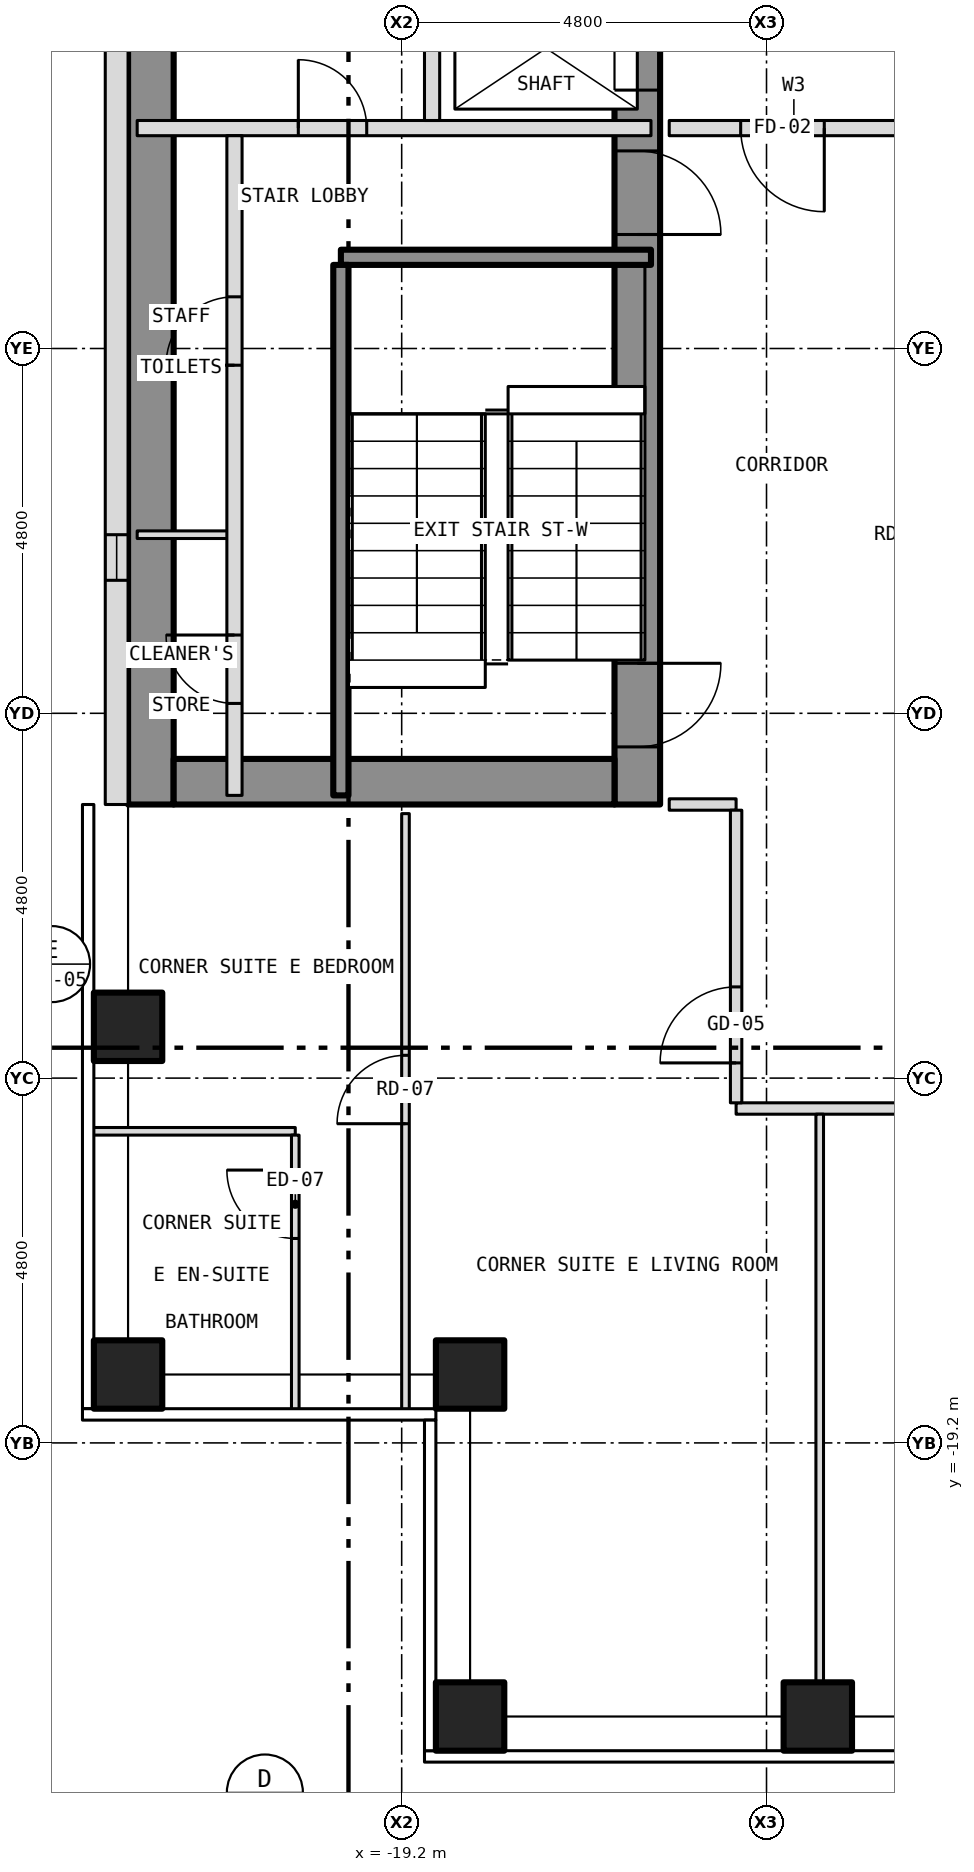
"""IFC4 building model, lengths in metres.
Left out: names, types, materials, properties, quantities, classifications, styles, units other than length and angle.
Written with IfcOpenShell. Run it as: python <this file> out.ifc"""

import sys

from ifc_helpers import new_model, si_unit, direction, frame, frame_2d, origin, origin_2d, place, context, subcontext, project, spatial, rectangle, hollow_rectangle, extrude, element, fill, save


model = new_model("IFC4")
c1 = context("Model", 3, precision=1e-05, world=origin(), true_north=direction((0.0, 1.0)))
c2 = subcontext(c1, "Body", "Model", "MODEL_VIEW")
j1 = project(units=[si_unit("LENGTHUNIT", "METRE"), si_unit("PLANEANGLEUNIT", "RADIAN")], contexts=[c1])
p1 = place(None, origin())
s1 = spatial("IfcSite", under=j1, at=p1, CompositionType="ELEMENT")
p2 = place(p1, origin())
s2 = spatial("IfcBuilding", under=s1, at=p2, CompositionType="ELEMENT")
p3 = place(p2, frame((0.0, 0.0, 117.0)))
s3 = spatial("IfcBuildingStorey", under=s2, at=p3, CompositionType="ELEMENT", Elevation=117.0)
for number, where, z_axis, x_axis in (
    (1, (-18.3, -22.8, -0.15), (0.0, 0.0, 1.0), (1.0, 0.0, 0.0)),
    (2, (-13.725, -22.8, -0.15), (0.0, 0.0, 1.0), (1.0, 0.0, 0.0)),
    (3, (-22.8, -18.3, -0.15), (0.0, 0.0, 1.0), (1.0, 0.0, 0.0)),
    (4, (-22.8, -13.725, -0.15), (0.0, 0.0, 1.0), (1.0, 0.0, 0.0)),
    (5, (-18.3, -18.3, -0.15), (0.0, 0.0, 1.0), (1.0, 0.0, 0.0)),
):
    element("IfcColumn", number, at=place(p3, frame(where, z_axis=z_axis, x_axis=x_axis)), inside=s3, PredefinedType="COLUMN", context=c2, shape_type="SweptSolid", body=[
        extrude(hollow_rectangle(XDim=0.9, YDim=0.9, WallThickness=0.05, at=origin_2d()), origin(), (0.0, 0.0, 1.0), 3.5),
    ])
p4 = place(p3, frame((-16.1, -10.8, 0.0), z_axis=(0.0, 0.0, 1.0), x_axis=(0.0, 1.0, 0.0)))
e6 = element("IfcWall", 6, at=p4, inside=s3, PredefinedType="SHEAR", context=c2, shape_type="SweptSolid", body=[
    extrude(rectangle(XDim=21.6, YDim=0.6, at=frame_2d((10.8, 0.0))), origin(), (0.0, 0.0, 1.0), 3.25),
])
p5 = place(p4, frame((9.4, 0.0, 0.0)))
e7 = element("IfcOpeningElement", 7, at=p5, cuts=e6, PredefinedType="OPENING", context=c2, shape_type="SweptSolid", body=[
    extrude(rectangle(XDim=1.1, YDim=2.1, at=frame_2d((0.55, 1.05))), frame((0.0, 0.312, 0.0), z_axis=(0.0, -1.0, 0.0), x_axis=(1.0, 0.0, 0.0)), (0.0, 0.0, 1.0), 0.624),
])
p6 = place(p4, frame((11.5, 0.0, 0.0)))
e8 = element("IfcOpeningElement", 8, at=p6, cuts=e6, PredefinedType="OPENING", context=c2, shape_type="SweptSolid", body=[
    extrude(rectangle(XDim=1.1, YDim=2.1, at=frame_2d((0.55, 1.05))), frame((0.0, 0.312, 0.0), z_axis=(0.0, -1.0, 0.0), x_axis=(1.0, 0.0, 0.0)), (0.0, 0.0, 1.0), 0.624),
])
p7 = place(p4, frame((13.6, 0.0, 0.0)))
e9 = element("IfcOpeningElement", 9, at=p7, cuts=e6, PredefinedType="OPENING", context=c2, shape_type="SweptSolid", body=[
    extrude(rectangle(XDim=1.1, YDim=2.1, at=frame_2d((0.55, 1.05))), frame((0.0, 0.312, 0.0), z_axis=(0.0, -1.0, 0.0), x_axis=(1.0, 0.0, 0.0)), (0.0, 0.0, 1.0), 0.624),
])
p8 = place(p4, frame((15.7, 0.0, 0.0)))
e10 = element("IfcOpeningElement", 10, at=p8, cuts=e6, PredefinedType="OPENING", context=c2, shape_type="SweptSolid", body=[
    extrude(rectangle(XDim=1.1, YDim=2.1, at=frame_2d((0.55, 1.05))), frame((0.0, 0.312, 0.0), z_axis=(0.0, -1.0, 0.0), x_axis=(1.0, 0.0, 0.0)), (0.0, 0.0, 1.0), 0.624),
])
p9 = place(p4, frame((17.8, 0.0, 0.0)))
e11 = element("IfcOpeningElement", 11, at=p9, cuts=e6, PredefinedType="OPENING", context=c2, shape_type="SweptSolid", body=[
    extrude(rectangle(XDim=1.1, YDim=2.1, at=frame_2d((0.55, 1.05))), frame((0.0, 0.312, 0.0), z_axis=(0.0, -1.0, 0.0), x_axis=(1.0, 0.0, 0.0)), (0.0, 0.0, 1.0), 0.624),
])
p10 = place(p4, frame((0.758, 0.0, 0.0)))
e12 = element("IfcOpeningElement", 12, at=p10, cuts=e6, PredefinedType="OPENING", context=c2, shape_type="SweptSolid", body=[
    extrude(rectangle(XDim=1.1, YDim=2.1, at=frame_2d((0.55, 1.05))), frame((0.0, 0.312, 0.0), z_axis=(0.0, -1.0, 0.0), x_axis=(1.0, 0.0, 0.0)), (0.0, 0.0, 1.0), 0.624),
])
p11 = place(p4, frame((7.5, 0.0, 0.0)))
e13 = element("IfcOpeningElement", 13, at=p11, cuts=e6, PredefinedType="OPENING", context=c2, shape_type="SweptSolid", body=[
    extrude(rectangle(XDim=1.1, YDim=2.1, at=frame_2d((0.55, 1.05))), frame((0.0, 0.312, 0.0), z_axis=(0.0, -1.0, 0.0), x_axis=(1.0, 0.0, 0.0)), (0.0, 0.0, 1.0), 0.624),
])
p12 = place(p3, frame((-22.5, -10.8, 0.0), z_axis=(0.0, 0.0, 1.0), x_axis=(0.0, 1.0, 0.0)))
e14 = element("IfcWall", 14, at=p12, inside=s3, PredefinedType="SHEAR", context=c2, shape_type="SweptSolid", body=[
    extrude(rectangle(XDim=21.6, YDim=0.6, at=frame_2d((10.8, 0.0))), origin(), (0.0, 0.0, 1.0), 3.25),
])
p13 = place(p3, frame((-22.2, -10.5, 0.0), z_axis=(0.0, 0.0, 1.0), x_axis=(1.0, 0.0, 0.0)))
e15 = element("IfcWall", 15, at=p13, inside=s3, PredefinedType="SHEAR", context=c2, shape_type="SweptSolid", body=[
    extrude(rectangle(XDim=5.8, YDim=0.6, at=frame_2d((2.9, 0.0))), origin(), (0.0, 0.0, 1.0), 3.25),
])
p14 = place(p3, frame((-22.95, 10.8, 0.0), z_axis=(0.0, 0.0, 1.0), x_axis=(0.0, -1.0, 0.0)))
e16 = element("IfcWall", 16, at=p14, inside=s3, PredefinedType="SOLIDWALL", context=c2, shape_type="SweptSolid", body=[
    extrude(rectangle(XDim=21.6, YDim=0.3, at=frame_2d((10.8, 0.0))), origin(), (0.0, 0.0, 1.0), 3.5),
])
p15 = place(p14, frame((18.05, 0.0, 1.0)))
e17 = element("IfcOpeningElement", 17, at=p15, cuts=e16, PredefinedType="OPENING", context=c2, shape_type="SweptSolid", body=[
    extrude(rectangle(XDim=0.6, YDim=1.5, at=frame_2d((0.3, 0.75))), frame((0.0, 0.162, 0.0), z_axis=(0.0, -1.0, 0.0), x_axis=(1.0, 0.0, 0.0)), (0.0, 0.0, 1.0), 0.324),
])
p16 = place(p3, frame((-23.28, -15.1, 0.0), z_axis=(0.0, 0.0, 1.0), x_axis=(1.0, 0.0, 0.0)))
e18 = element("IfcWall", 18, at=p16, inside=s3, PredefinedType="PARTITIONING", context=c2, shape_type="SweptSolid", body=[
    extrude(rectangle(XDim=2.68, YDim=0.1, at=frame_2d((1.34, 0.0))), origin(), (0.0, 0.0, 1.0), 3.35),
])
p17 = place(p3, frame((-14.8, -14.8, 0.0), z_axis=(0.0, 0.0, 1.0), x_axis=(1.0, 0.0, 0.0)))
e19 = element("IfcWall", 19, at=p17, inside=s3, PredefinedType="PARTITIONING", context=c2, shape_type="SweptSolid", body=[
    extrude(rectangle(XDim=6.85, YDim=0.15, at=frame_2d((3.425, 0.0))), origin(), (0.0, 0.0, 1.0), 3.35),
])
p18 = place(p17, frame((2.363, 0.0, 0.0)))
e20 = element("IfcOpeningElement", 20, at=p18, cuts=e19, PredefinedType="OPENING", context=c2, shape_type="SweptSolid", body=[
    extrude(rectangle(XDim=1.0, YDim=2.1, at=frame_2d((0.5, 1.05))), frame((0.0, 0.087, 0.0), z_axis=(0.0, -1.0, 0.0), x_axis=(1.0, 0.0, 0.0)), (0.0, 0.0, 1.0), 0.174),
])
p19 = place(p3, frame((-15.68, -10.8, 0.0), z_axis=(0.0, 0.0, 1.0), x_axis=(1.0, 0.0, 0.0)))
e21 = element("IfcWall", 21, at=p19, inside=s3, PredefinedType="PARTITIONING", context=c2, shape_type="SweptSolid", body=[
    extrude(rectangle(XDim=0.88, YDim=0.15, at=frame_2d((0.44, 0.0))), origin(), (0.0, 0.0, 1.0), 3.35),
])
p20 = place(p3, frame((-22.68, -7.25, 0.0), z_axis=(0.0, 0.0, 1.0), x_axis=(1.0, 0.0, 0.0)))
e22 = element("IfcWall", 22, at=p20, inside=s3, PredefinedType="PARTITIONING", context=c2, shape_type="SweptSolid", body=[
    extrude(rectangle(XDim=1.28, YDim=0.1, at=frame_2d((0.64, 0.0))), origin(), (0.0, 0.0, 1.0), 3.25),
])
p21 = place(p3, frame((-20.0, -3.6, 0.0), z_axis=(0.0, 0.0, 1.0), x_axis=(1.0, 0.0, 0.0)))
e23 = element("IfcWall", 23, at=p21, inside=s3, PredefinedType="SHEAR", context=c2, shape_type="SweptSolid", body=[
    extrude(rectangle(XDim=4.08, YDim=0.2, at=frame_2d((2.04, 0.0))), origin(), (0.0, 0.0, 1.0), 3.25),
])
p22 = place(p3, frame((-22.68, -1.9, 0.0), z_axis=(0.0, 0.0, 1.0), x_axis=(1.0, 0.0, 0.0)))
e24 = element("IfcWall", 24, at=p22, inside=s3, PredefinedType="PARTITIONING", context=c2, shape_type="SweptSolid", body=[
    extrude(rectangle(XDim=6.76, YDim=0.2, at=frame_2d((3.38, 0.0))), origin(), (0.0, 0.0, 1.0), 3.25),
])
p23 = place(p22, frame((2.12, 0.0, 0.0)))
e25 = element("IfcOpeningElement", 25, at=p23, cuts=e24, PredefinedType="OPENING", context=c2, shape_type="SweptSolid", body=[
    extrude(rectangle(XDim=0.9, YDim=2.1, at=frame_2d((0.45, 1.05))), frame((0.0, 0.112, 0.0), z_axis=(0.0, -1.0, 0.0), x_axis=(1.0, 0.0, 0.0)), (0.0, 0.0, 1.0), 0.224),
])
p24 = place(p3, frame((-15.68, -1.9, 0.0), z_axis=(0.0, 0.0, 1.0), x_axis=(1.0, 0.0, 0.0)))
e26 = element("IfcWall", 26, at=p24, inside=s3, PredefinedType="PARTITIONING", context=c2, shape_type="SweptSolid", body=[
    extrude(rectangle(XDim=3.28, YDim=0.2, at=frame_2d((1.64, 0.0))), origin(), (0.0, 0.0, 1.0), 3.35),
])
p25 = place(p24, frame((0.94, 0.0, 0.0)))
e27 = element("IfcOpeningElement", 27, at=p25, cuts=e26, PredefinedType="OPENING", context=c2, shape_type="SweptSolid", body=[
    extrude(rectangle(XDim=1.1, YDim=2.1, at=frame_2d((0.55, 1.05))), frame((0.0, 0.112, 0.0), z_axis=(0.0, -1.0, 0.0), x_axis=(1.0, 0.0, 0.0)), (0.0, 0.0, 1.0), 0.224),
])
p26 = place(p3, frame((-21.4, -10.68, 0.0), z_axis=(0.0, 0.0, 1.0), x_axis=(0.0, 1.0, 0.0)))
e28 = element("IfcWall", 28, at=p26, inside=s3, PredefinedType="PARTITIONING", context=c2, shape_type="SweptSolid", body=[
    extrude(rectangle(XDim=8.68, YDim=0.2, at=frame_2d((4.34, 0.0))), origin(), (0.0, 0.0, 1.0), 3.25),
])
p27 = place(p26, frame((1.21, 0.0, 0.0)))
e29 = element("IfcOpeningElement", 29, at=p27, cuts=e28, PredefinedType="OPENING", context=c2, shape_type="SweptSolid", body=[
    extrude(rectangle(XDim=0.9, YDim=2.1, at=frame_2d((0.45, 1.05))), frame((0.0, 0.112, 0.0), z_axis=(0.0, -1.0, 0.0), x_axis=(1.0, 0.0, 0.0)), (0.0, 0.0, 1.0), 0.224),
])
p28 = place(p26, frame((5.66, 0.0, 0.0)))
e30 = element("IfcOpeningElement", 30, at=p28, cuts=e28, PredefinedType="OPENING", context=c2, shape_type="SweptSolid", body=[
    extrude(rectangle(XDim=0.9, YDim=2.1, at=frame_2d((0.45, 1.05))), frame((0.0, 0.112, 0.0), z_axis=(0.0, -1.0, 0.0), x_axis=(1.0, 0.0, 0.0)), (0.0, 0.0, 1.0), 0.224),
])
p29 = place(p3, frame((-20.6, -18.78, 0.0), z_axis=(0.0, 0.0, 1.0), x_axis=(0.0, 1.0, 0.0)))
e31 = element("IfcWall", 31, at=p29, inside=s3, PredefinedType="PARTITIONING", context=c2, shape_type="SweptSolid", body=[
    extrude(rectangle(XDim=3.63, YDim=0.1, at=frame_2d((1.815, 0.0))), origin(), (0.0, 0.0, 1.0), 3.35),
])
p30 = place(p29, frame((2.27, 0.0, 0.0)))
e32 = element("IfcOpeningElement", 32, at=p30, cuts=e31, PredefinedType="OPENING", context=c2, shape_type="SweptSolid", body=[
    extrude(rectangle(XDim=0.9, YDim=2.1, at=frame_2d((0.45, 1.05))), frame((0.0, 0.062, 0.0), z_axis=(0.0, -1.0, 0.0), x_axis=(1.0, 0.0, 0.0)), (0.0, 0.0, 1.0), 0.124),
])
p31 = place(p3, frame((-20.0, -10.68, 0.0), z_axis=(0.0, 0.0, 1.0), x_axis=(0.0, 1.0, 0.0)))
e33 = element("IfcWall", 33, at=p31, inside=s3, PredefinedType="SHEAR", context=c2, shape_type="SweptSolid", body=[
    extrude(rectangle(XDim=6.98, YDim=0.2, at=frame_2d((3.49, 0.0))), origin(), (0.0, 0.0, 1.0), 3.25),
])
p32 = place(p3, frame((-19.15, -18.78, 0.0), z_axis=(0.0, 0.0, 1.0), x_axis=(0.0, 1.0, 0.0)))
e34 = element("IfcWall", 34, at=p32, inside=s3, PredefinedType="PARTITIONING", context=c2, shape_type="SweptSolid", body=[
    extrude(rectangle(XDim=7.86, YDim=0.1, at=frame_2d((3.93, 0.0))), origin(), (0.0, 0.0, 1.0), 2.817),
])
p33 = place(p32, frame((3.78, 0.0, 0.0)))
e35 = element("IfcOpeningElement", 35, at=p33, cuts=e34, PredefinedType="OPENING", context=c2, shape_type="SweptSolid", body=[
    extrude(rectangle(XDim=0.9, YDim=2.1, at=frame_2d((0.45, 1.05))), frame((0.0, 0.062, 0.0), z_axis=(0.0, -1.0, 0.0), x_axis=(1.0, 0.0, 0.0)), (0.0, 0.0, 1.0), 0.124),
])
p34 = place(p3, frame((-18.8, -1.8, 0.0), z_axis=(0.0, 0.0, 1.0), x_axis=(0.0, 1.0, 0.0)))
e36 = element("IfcWall", 36, at=p34, inside=s3, PredefinedType="PARTITIONING", context=c2, shape_type="SweptSolid", body=[
    extrude(rectangle(XDim=12.48, YDim=0.2, at=frame_2d((6.24, 0.0))), origin(), (0.0, 0.0, 1.0), 3.25),
])
p35 = place(p3, frame((-14.8, -14.725, 0.0), z_axis=(0.0, 0.0, 1.0), x_axis=(0.0, 1.0, 0.0)))
e37 = element("IfcWall", 37, at=p35, inside=s3, PredefinedType="PARTITIONING", context=c2, shape_type="SweptSolid", body=[
    extrude(rectangle(XDim=3.85, YDim=0.15, at=frame_2d((1.925, 0.0))), origin(), (0.0, 0.0, 1.0), 3.35),
])
p36 = place(p35, frame((0.525, 0.0, 0.0)))
e38 = element("IfcOpeningElement", 38, at=p36, cuts=e37, PredefinedType="OPENING", context=c2, shape_type="SweptSolid", body=[
    extrude(rectangle(XDim=1.0, YDim=2.1, at=frame_2d((0.5, 1.05))), frame((0.0, 0.087, 0.0), z_axis=(0.0, -1.0, 0.0), x_axis=(1.0, 0.0, 0.0)), (0.0, 0.0, 1.0), 0.174),
])
p37 = place(p3, frame((-13.7, -22.68, 0.0), z_axis=(0.0, 0.0, 1.0), x_axis=(0.0, 1.0, 0.0)))
e39 = element("IfcWall", 39, at=p37, inside=s3, PredefinedType="PARTITIONING", context=c2, shape_type="SweptSolid", body=[
    extrude(rectangle(XDim=7.805, YDim=0.1, at=frame_2d((3.902, 0.0))), origin(), (0.0, 0.0, 1.0), 3.35),
])
p38 = place(p15, origin())
e40 = element("IfcWindow", 40, at=p38, inside=s3, PartitioningType="SINGLE_PANEL", PredefinedType="WINDOW", context=c2, shape_type="SweptSolid", body=[
    extrude(rectangle(XDim=0.6, YDim=1.5, at=frame_2d((0.3, 0.75))), frame((0.0, -0.06, 0.0), z_axis=(0.0, -1.0, 0.0), x_axis=(1.0, 0.0, 0.0)), (0.0, 0.0, 1.0), 0.06),
])
fill(e17, e40)
p39 = place(p5, origin())
e41 = element("IfcDoor", 41, at=p39, inside=s3, OperationType="SLIDING_TO_LEFT", PredefinedType="DOOR", context=c2, shape_type="SweptSolid", body=[
    extrude(rectangle(XDim=1.1, YDim=2.1, at=frame_2d((0.55, 1.05))), frame((0.0, 0.025, 0.0), z_axis=(0.0, -1.0, 0.0), x_axis=(1.0, 0.0, 0.0)), (0.0, 0.0, 1.0), 0.05),
])
fill(e7, e41)
p40 = place(p10, origin())
e42 = element("IfcDoor", 42, at=p40, inside=s3, OperationType="SINGLE_SWING_RIGHT", PredefinedType="DOOR", context=c2, shape_type="SweptSolid", body=[
    extrude(rectangle(XDim=1.1, YDim=2.1, at=frame_2d((0.55, 1.05))), frame((0.0, 0.025, 0.0), z_axis=(0.0, -1.0, 0.0), x_axis=(1.0, 0.0, 0.0)), (0.0, 0.0, 1.0), 0.05),
])
fill(e12, e42)
p41 = place(p11, origin())
e43 = element("IfcDoor", 43, at=p41, inside=s3, OperationType="SINGLE_SWING_LEFT", PredefinedType="DOOR", context=c2, shape_type="SweptSolid", body=[
    extrude(rectangle(XDim=1.1, YDim=2.1, at=frame_2d((0.55, 1.05))), frame((0.0, 0.025, 0.0), z_axis=(0.0, -1.0, 0.0), x_axis=(1.0, 0.0, 0.0)), (0.0, 0.0, 1.0), 0.05),
])
fill(e13, e43)
p42 = place(p27, origin())
e44 = element("IfcDoor", 44, at=p42, inside=s3, OperationType="SINGLE_SWING_RIGHT", PredefinedType="DOOR", context=c2, shape_type="SweptSolid", body=[
    extrude(rectangle(XDim=0.9, YDim=2.1, at=frame_2d((0.45, 1.05))), frame((0.0, 0.025, 0.0), z_axis=(0.0, -1.0, 0.0), x_axis=(1.0, 0.0, 0.0)), (0.0, 0.0, 1.0), 0.05),
])
fill(e29, e44)
p43 = place(p28, origin())
e45 = element("IfcDoor", 45, at=p43, inside=s3, OperationType="SINGLE_SWING_LEFT", PredefinedType="DOOR", context=c2, shape_type="SweptSolid", body=[
    extrude(rectangle(XDim=0.9, YDim=2.1, at=frame_2d((0.45, 1.05))), frame((0.0, 0.025, 0.0), z_axis=(0.0, -1.0, 0.0), x_axis=(1.0, 0.0, 0.0)), (0.0, 0.0, 1.0), 0.05),
])
fill(e30, e45)
p44 = place(p23, origin())
e46 = element("IfcDoor", 46, at=p44, inside=s3, OperationType="SINGLE_SWING_LEFT", PredefinedType="DOOR", context=c2, shape_type="SweptSolid", body=[
    extrude(rectangle(XDim=0.9, YDim=2.1, at=frame_2d((0.45, 1.05))), frame((0.0, 0.025, 0.0), z_axis=(0.0, -1.0, 0.0), x_axis=(1.0, 0.0, 0.0)), (0.0, 0.0, 1.0), 0.05),
])
fill(e25, e46)
p45 = place(p25, origin())
e47 = element("IfcDoor", 47, at=p45, inside=s3, OperationType="SINGLE_SWING_RIGHT", PredefinedType="DOOR", context=c2, shape_type="SweptSolid", body=[
    extrude(rectangle(XDim=1.1, YDim=2.1, at=frame_2d((0.55, 1.05))), frame((0.0, 0.025, 0.0), z_axis=(0.0, -1.0, 0.0), x_axis=(1.0, 0.0, 0.0)), (0.0, 0.0, 1.0), 0.05),
])
fill(e27, e47)
p46 = place(p36, origin())
e48 = element("IfcDoor", 48, at=p46, inside=s3, OperationType="SINGLE_SWING_LEFT", PredefinedType="DOOR", context=c2, shape_type="SweptSolid", body=[
    extrude(rectangle(XDim=1.0, YDim=2.1, at=frame_2d((0.5, 1.05))), frame((0.0, 0.025, 0.0), z_axis=(0.0, -1.0, 0.0), x_axis=(1.0, 0.0, 0.0)), (0.0, 0.0, 1.0), 0.05),
])
fill(e38, e48)
p47 = place(p33, origin())
e49 = element("IfcDoor", 49, at=p47, inside=s3, OperationType="SINGLE_SWING_LEFT", PredefinedType="DOOR", context=c2, shape_type="SweptSolid", body=[
    extrude(rectangle(XDim=0.9, YDim=2.1, at=frame_2d((0.45, 1.05))), frame((0.0, 0.025, 0.0), z_axis=(0.0, -1.0, 0.0), x_axis=(1.0, 0.0, 0.0)), (0.0, 0.0, 1.0), 0.05),
])
fill(e35, e49)
p48 = place(p30, origin())
e50 = element("IfcDoor", 50, at=p48, inside=s3, OperationType="SINGLE_SWING_RIGHT", PredefinedType="DOOR", context=c2, shape_type="SweptSolid", body=[
    extrude(rectangle(XDim=0.9, YDim=2.1, at=frame_2d((0.45, 1.05))), frame((0.0, 0.025, 0.0), z_axis=(0.0, -1.0, 0.0), x_axis=(1.0, 0.0, 0.0)), (0.0, 0.0, 1.0), 0.05),
])
fill(e32, e50)
save(model, sys.argv[1])
